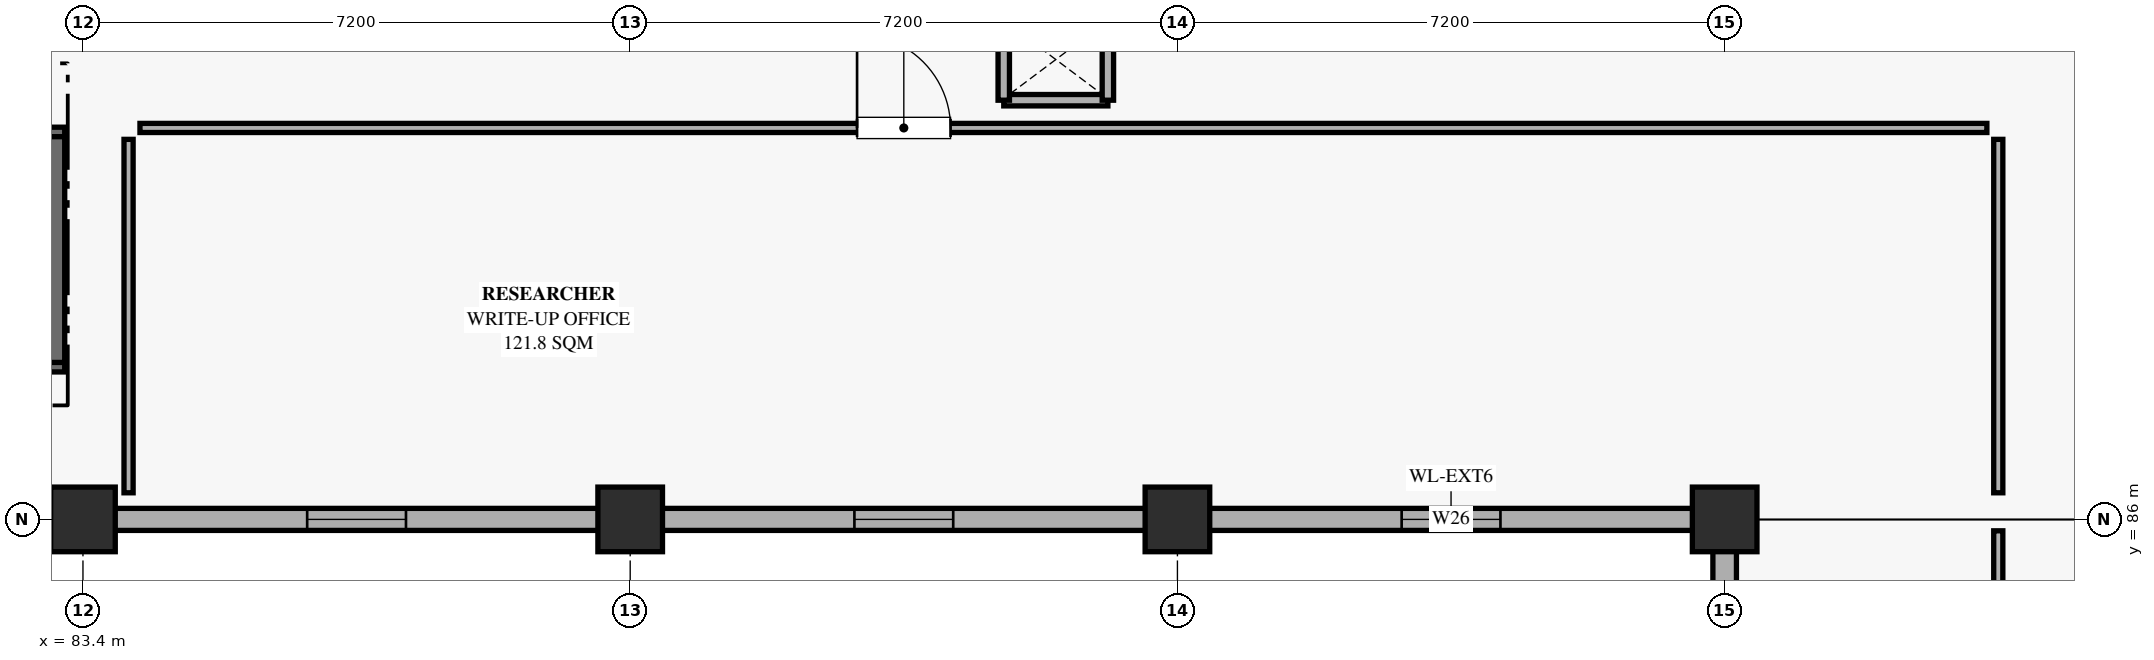
"""IFC4 building model, lengths in metres.
Left out: names, types, materials, properties, quantities, classifications, styles, units other than length and angle.
Written with IfcOpenShell. Run it as: python <this file> out.ifc"""

import sys

from ifc_helpers import new_model, si_unit, direction, frame, frame_2d, origin, origin_2d, place, context, subcontext, project, spatial, rectangle, extrude, element, fill, save


model = new_model("IFC4")
c1 = context("Model", 3, precision=1e-05, world=origin(), true_north=direction((0.0, 1.0)))
c2 = subcontext(c1, "Body", "Model", "MODEL_VIEW")
j1 = project(units=[si_unit("LENGTHUNIT", "METRE"), si_unit("PLANEANGLEUNIT", "RADIAN")], contexts=[c1])
p1 = place(None, origin())
s1 = spatial("IfcSite", under=j1, at=p1, CompositionType="ELEMENT")
p2 = place(p1, origin())
s2 = spatial("IfcBuilding", under=s1, at=p2, CompositionType="ELEMENT")
p3 = place(p2, frame((0.0, 0.0, 5.4)))
s3 = spatial("IfcBuildingStorey", under=s2, at=p3, CompositionType="ELEMENT", Elevation=5.4)
for number, where, z_axis, x_axis in (
    (1, (83.4, 86.0, 0.0), (0.0, 0.0, 1.0), (1.0, 0.0, 0.0)),
    (2, (90.6, 86.0, 0.0), (0.0, 0.0, 1.0), (1.0, 0.0, 0.0)),
    (3, (97.8, 86.0, 0.0), (0.0, 0.0, 1.0), (1.0, 0.0, 0.0)),
    (4, (105.0, 86.0, 0.0), (0.0, 0.0, 1.0), (1.0, 0.0, 0.0)),
):
    element("IfcColumn", number, at=place(p3, frame(where, z_axis=z_axis, x_axis=x_axis)), inside=s3, PredefinedType="COLUMN", context=c2, shape_type="SweptSolid", body=[
        extrude(rectangle(XDim=0.85, YDim=0.85, at=origin_2d()), origin(), (0.0, 0.0, 1.0), 5.04),
    ])
p4 = place(p3, frame((105.0, 79.21, 0.0), z_axis=(0.0, 0.0, 1.0), x_axis=(0.0, 1.0, 0.0)))
e5 = element("IfcWall", 5, at=p4, inside=s3, PredefinedType="SOLIDWALL", context=c2, shape_type="SweptSolid", body=[
    extrude(rectangle(XDim=6.38, YDim=0.31, at=frame_2d((3.19, 0.0))), origin(), (0.0, 0.0, 1.0), 3.54),
])
p5 = place(p4, frame((2.24, 0.0, 0.9)))
e6 = element("IfcOpeningElement", 6, at=p5, cuts=e5, PredefinedType="OPENING", context=c2, shape_type="SweptSolid", body=[
    extrude(rectangle(XDim=1.9, YDim=2.0, at=frame_2d((0.95, 1.0))), frame((0.0, 0.165, 0.0), z_axis=(0.0, -1.0, 0.0), x_axis=(1.0, 0.0, 0.0)), (0.0, 0.0, 1.0), 0.33),
])
p6 = place(p3, frame((104.59, 86.0, 0.0), z_axis=(0.0, 0.0, 1.0), x_axis=(-1.0, 0.0, 0.0)))
e7 = element("IfcWall", 7, at=p6, inside=s3, PredefinedType="SOLIDWALL", context=c2, shape_type="SweptSolid", body=[
    extrude(rectangle(XDim=6.38, YDim=0.29, at=frame_2d((3.19, 0.0))), origin(), (0.0, 0.0, 1.0), 3.54),
])
p7 = place(p6, frame((2.54, 0.0, 0.9)))
e8 = element("IfcOpeningElement", 8, at=p7, cuts=e7, PredefinedType="OPENING", context=c2, shape_type="SweptSolid", body=[
    extrude(rectangle(XDim=1.3, YDim=1.9, at=frame_2d((0.65, 0.95))), frame((0.0, 0.155, 0.0), z_axis=(0.0, -1.0, 0.0), x_axis=(1.0, 0.0, 0.0)), (0.0, 0.0, 1.0), 0.31),
])
p8 = place(p3, frame((97.39, 86.0, 0.0), z_axis=(0.0, 0.0, 1.0), x_axis=(-1.0, 0.0, 0.0)))
e9 = element("IfcWall", 9, at=p8, inside=s3, PredefinedType="SOLIDWALL", context=c2, shape_type="SweptSolid", body=[
    extrude(rectangle(XDim=6.38, YDim=0.29, at=frame_2d((3.19, 0.0))), origin(), (0.0, 0.0, 1.0), 3.54),
])
p9 = place(p8, frame((2.54, 0.0, 0.9)))
e10 = element("IfcOpeningElement", 10, at=p9, cuts=e9, PredefinedType="OPENING", context=c2, shape_type="SweptSolid", body=[
    extrude(rectangle(XDim=1.3, YDim=1.9, at=frame_2d((0.65, 0.95))), frame((0.0, 0.155, 0.0), z_axis=(0.0, -1.0, 0.0), x_axis=(1.0, 0.0, 0.0)), (0.0, 0.0, 1.0), 0.31),
])
p10 = place(p3, frame((90.19, 86.0, 0.0), z_axis=(0.0, 0.0, 1.0), x_axis=(-1.0, 0.0, 0.0)))
e11 = element("IfcWall", 11, at=p10, inside=s3, PredefinedType="SOLIDWALL", context=c2, shape_type="SweptSolid", body=[
    extrude(rectangle(XDim=6.38, YDim=0.29, at=frame_2d((3.19, 0.0))), origin(), (0.0, 0.0, 1.0), 3.54),
])
p11 = place(p10, frame((2.54, 0.0, 0.9)))
e12 = element("IfcOpeningElement", 12, at=p11, cuts=e11, PredefinedType="OPENING", context=c2, shape_type="SweptSolid", body=[
    extrude(rectangle(XDim=1.3, YDim=1.9, at=frame_2d((0.65, 0.95))), frame((0.0, 0.155, 0.0), z_axis=(0.0, -1.0, 0.0), x_axis=(1.0, 0.0, 0.0)), (0.0, 0.0, 1.0), 0.31),
])
p12 = place(p3, frame((96.885, 91.515, 0.0), z_axis=(0.0, 0.0, 1.0), x_axis=(-1.0, 0.0, 0.0)))
e13 = element("IfcWall", 13, at=p12, inside=s3, PredefinedType="PARTITIONING", context=c2, shape_type="SweptSolid", body=[
    extrude(rectangle(XDim=1.37, YDim=0.15, at=frame_2d((0.685, 0.0))), origin(), (0.0, 0.0, 1.0), 3.52),
])
for number, where, z_axis, x_axis in (
    (14, (95.515, 91.515, 0.0), (0.0, 0.0, 1.0), (0.0, 1.0, 0.0)),
    (15, (96.885, 92.585, 0.0), (0.0, 0.0, 1.0), (0.0, -1.0, 0.0)),
):
    element("IfcWall", number, at=place(p3, frame(where, z_axis=z_axis, x_axis=x_axis)), inside=s3, PredefinedType="PARTITIONING", context=c2, shape_type="SweptSolid", body=[
        extrude(rectangle(XDim=1.07, YDim=0.15, at=frame_2d((0.535, 0.0))), origin(), (0.0, 0.0, 1.0), 3.52),
    ])
p13 = place(p3, frame((83.16, 88.065, 0.0), z_axis=(0.0, 0.0, 1.0), x_axis=(-1.0, 0.0, 0.0)))
e16 = element("IfcWall", 16, at=p13, inside=s3, PredefinedType="SHEAR", context=c2, shape_type="SweptSolid", body=[
    extrude(rectangle(XDim=2.62, YDim=0.25, at=frame_2d((1.31, 0.0))), origin(), (0.0, 0.0, 1.0), 4.77),
])
p14 = place(p3, frame((80.54, 91.035, 0.0), z_axis=(0.0, 0.0, 1.0), x_axis=(1.0, 0.0, 0.0)))
e17 = element("IfcWall", 17, at=p14, inside=s3, PredefinedType="SHEAR", context=c2, shape_type="SweptSolid", body=[
    extrude(rectangle(XDim=2.62, YDim=0.25, at=frame_2d((1.31, 0.0))), origin(), (0.0, 0.0, 1.0), 4.77),
])
p15 = place(p14, frame((0.76, 0.0, 0.0)))
e18 = element("IfcOpeningElement", 18, at=p15, cuts=e17, PredefinedType="OPENING", context=c2, shape_type="SweptSolid", body=[
    extrude(rectangle(XDim=1.1, YDim=2.2, at=frame_2d((0.55, 1.1))), frame((0.0, 0.135, 0.0), z_axis=(0.0, -1.0, 0.0), x_axis=(1.0, 0.0, 0.0)), (0.0, 0.0, 1.0), 0.27),
])
p16 = place(p3, frame((83.035, 91.035, 0.0), z_axis=(0.0, 0.0, 1.0), x_axis=(0.0, -1.0, 0.0)))
e19 = element("IfcWall", 19, at=p16, inside=s3, PredefinedType="SHEAR", context=c2, shape_type="SweptSolid", body=[
    extrude(rectangle(XDim=2.97, YDim=0.25, at=frame_2d((1.485, 0.0))), origin(), (0.0, 0.0, 1.0), 4.77),
])
p17 = place(p3, frame((108.6, 85.85, 0.0), z_axis=(0.0, 0.0, 1.0), x_axis=(0.0, -1.0, 0.0)))
e20 = element("IfcWall", 20, at=p17, inside=s3, PredefinedType="PARTITIONING", context=c2, shape_type="SweptSolid", body=[
    extrude(rectangle(XDim=21.3, YDim=0.12, at=frame_2d((10.65, 0.0))), origin(), (0.0, 0.0, 1.0), 3.52),
])
p18 = place(p17, frame((10.055, 0.0, 0.0)))
e21 = element("IfcOpeningElement", 21, at=p18, cuts=e20, PredefinedType="OPENING", context=c2, shape_type="SweptSolid", body=[
    extrude(rectangle(XDim=1.19, YDim=2.16, at=frame_2d((0.595, 1.08))), frame((0.0, 0.07, 0.0), z_axis=(0.0, -1.0, 0.0), x_axis=(1.0, 0.0, 0.0)), (0.0, 0.0, 1.0), 0.14),
])
p19 = place(p3, frame((84.15, 91.15, 0.0), z_axis=(0.0, 0.0, 1.0), x_axis=(1.0, 0.0, 0.0)))
e22 = element("IfcWall", 22, at=p19, inside=s3, PredefinedType="PARTITIONING", context=c2, shape_type="SweptSolid", body=[
    extrude(rectangle(XDim=24.3, YDim=0.12, at=frame_2d((12.15, 0.0))), origin(), (0.0, 0.0, 1.0), 3.52),
])
p20 = place(p19, frame((9.435, 0.0, 0.0)))
e23 = element("IfcOpeningElement", 23, at=p20, cuts=e22, PredefinedType="OPENING", context=c2, shape_type="SweptSolid", body=[
    extrude(rectangle(XDim=1.23, YDim=2.1, at=frame_2d((0.615, 1.05))), frame((0.0, 0.07, 0.0), z_axis=(0.0, -1.0, 0.0), x_axis=(1.0, 0.0, 0.0)), (0.0, 0.0, 1.0), 0.14),
])
for number, where, z_axis, x_axis in (
    (24, (84.0, 86.35, 0.0), (0.0, 0.0, 1.0), (0.0, 1.0, 0.0)),
    (25, (108.6, 91.0, 0.0), (0.0, 0.0, 1.0), (0.0, -1.0, 0.0)),
):
    element("IfcWall", number, at=place(p3, frame(where, z_axis=z_axis, x_axis=x_axis)), inside=s3, PredefinedType="PARTITIONING", context=c2, shape_type="SweptSolid", body=[
        extrude(rectangle(XDim=4.65, YDim=0.12, at=frame_2d((2.325, 0.0))), origin(), (0.0, 0.0, 1.0), 3.52),
    ])
p21 = place(p7, origin())
e26 = element("IfcWindow", 26, at=p21, inside=s3, PartitioningType="SINGLE_PANEL", PredefinedType="WINDOW", context=c2, shape_type="SweptSolid", body=[
    extrude(rectangle(XDim=1.3, YDim=1.9, at=frame_2d((0.65, 0.95))), frame((0.0, 0.03, 0.0), z_axis=(0.0, -1.0, 0.0), x_axis=(1.0, 0.0, 0.0)), (0.0, 0.0, 1.0), 0.06),
])
fill(e8, e26)
p22 = place(p9, origin())
e27 = element("IfcWindow", 27, at=p22, inside=s3, PartitioningType="SINGLE_PANEL", PredefinedType="WINDOW", context=c2, shape_type="SweptSolid", body=[
    extrude(rectangle(XDim=1.3, YDim=1.9, at=frame_2d((0.65, 0.95))), frame((0.0, 0.03, 0.0), z_axis=(0.0, -1.0, 0.0), x_axis=(1.0, 0.0, 0.0)), (0.0, 0.0, 1.0), 0.06),
])
fill(e10, e27)
p23 = place(p11, origin())
e28 = element("IfcWindow", 28, at=p23, inside=s3, PartitioningType="SINGLE_PANEL", PredefinedType="WINDOW", context=c2, shape_type="SweptSolid", body=[
    extrude(rectangle(XDim=1.3, YDim=1.9, at=frame_2d((0.65, 0.95))), frame((0.0, 0.03, 0.0), z_axis=(0.0, -1.0, 0.0), x_axis=(1.0, 0.0, 0.0)), (0.0, 0.0, 1.0), 0.06),
])
fill(e12, e28)
p24 = place(p20, origin())
e29 = element("IfcDoor", 29, at=p24, inside=s3, OperationType="SINGLE_SWING_LEFT", PredefinedType="DOOR", context=c2, shape_type="SweptSolid", body=[
    extrude(rectangle(XDim=1.23, YDim=2.1, at=frame_2d((0.615, 1.05))), frame((0.0, 0.025, 0.0), z_axis=(0.0, -1.0, 0.0), x_axis=(1.0, 0.0, 0.0)), (0.0, 0.0, 1.0), 0.05),
])
fill(e23, e29)
save(model, sys.argv[1])
